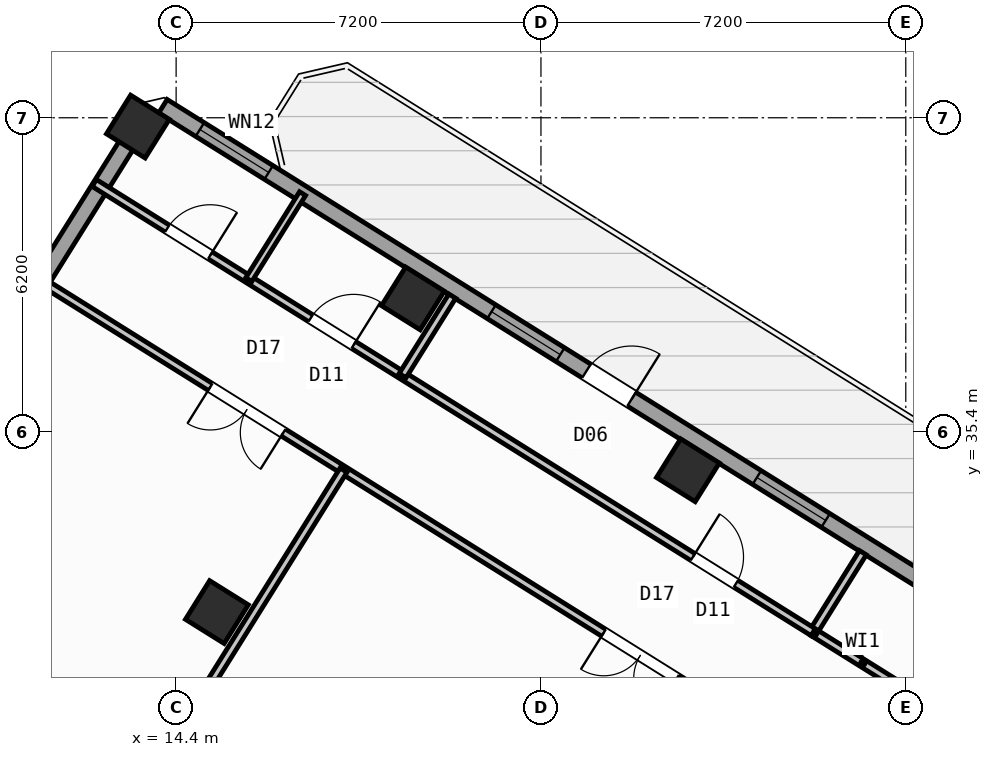
"""IFC4 building model, lengths in metres.
Left out: names, types, materials, properties, quantities, classifications, styles, units other than length and angle.
Written with IfcOpenShell. Run it as: python <this file> out.ifc"""

import sys

from ifc_helpers import new_model, si_unit, direction, frame, frame_2d, origin, origin_2d, place, context, subcontext, project, spatial, rectangle, hollow_rectangle, extrude, source, transform, mapped, element, fill, save


model = new_model("IFC4")
c1 = context("Model", 3, precision=1e-05, world=origin(), true_north=direction((0.0, 1.0)))
c2 = subcontext(c1, "Body", "Model", "MODEL_VIEW")
j1 = project(units=[si_unit("LENGTHUNIT", "METRE"), si_unit("PLANEANGLEUNIT", "RADIAN")], contexts=[c1])
p1 = place(None, origin())
s1 = spatial("IfcSite", under=j1, at=p1, CompositionType="ELEMENT")
p2 = place(p1, origin())
s2 = spatial("IfcBuilding", under=s1, at=p2, CompositionType="ELEMENT")
p3 = place(p2, frame((0.0, 0.0, 136.2)))
s3 = spatial("IfcBuildingStorey", under=s2, at=p3, CompositionType="ELEMENT", Elevation=136.2)
p4 = place(p3, frame((29.517, 30.594, 0.0), z_axis=(0.0, 0.0, 1.0), x_axis=(-0.529906864564, -0.848055844204, 0.0)))
e1 = element("IfcWall", 1, at=p4, inside=s3, PredefinedType="SHEAR", context=c2, shape_type="SweptSolid", body=[
    extrude(rectangle(XDim=3.575, YDim=0.55, at=frame_2d((1.788, 0.0))), origin(), (0.0, 0.0, 1.0), 4.25),
])
m1 = source(origin(), c2, "Body", "SweptSolid", [
    extrude(hollow_rectangle(XDim=0.9, YDim=0.9, WallThickness=0.036, at=origin_2d()), origin(), (0.0, 0.0, 1.0), 4.5),
])
for number, where, z_axis, x_axis in (
    (2, (24.5, 34.643, 0.0), (0.0, 0.0, 1.0), (-0.848, 0.53, 0.0)),
    (3, (19.073, 38.034, 0.0), (0.0, 0.0, 1.0), (-0.848, 0.53, 0.0)),
    (4, (15.205, 31.844, 0.0), (0.0, 0.0, 1.0), (-0.848, 0.53, 0.0)),
    (5, (13.646, 41.426, 0.0), (0.0, 0.0, 1.0), (-0.848, 0.53, 0.0)),
):
    element("IfcColumn", number, at=place(p3, frame(where, z_axis=z_axis, x_axis=x_axis)), inside=s3, PredefinedType="COLUMN", context=c2, shape_type="MappedRepresentation", body=[
        mapped(m1, transform((0.0, 0.0, 0.0), scale=1.0)),
    ])
p5 = place(p3, frame((2.415, 23.452, 0.0), z_axis=(0.0, 0.0, 1.0), x_axis=(0.52991049553, 0.848053575387, 0.0)))
e6 = element("IfcWall", 6, at=p5, inside=s3, PredefinedType="STANDARD", context=c2, shape_type="SweptSolid", body=[
    extrude(rectangle(XDim=21.587, YDim=0.32, at=frame_2d((10.794, 0.0))), origin(), (0.0, 0.0, 1.0), 3.675),
])
p6 = place(p5, frame((2.106, 0.0, 0.7)))
e7 = element("IfcOpeningElement", 7, at=p6, cuts=e6, PredefinedType="OPENING", context=c2, shape_type="SweptSolid", body=[
    extrude(rectangle(XDim=2.6, YDim=2.0, at=frame_2d((1.3, 1.0))), frame((0.0, 0.17, 0.0), z_axis=(0.0, -1.0, 0.0), x_axis=(1.0, 0.0, 0.0)), (0.0, 0.0, 1.0), 0.34),
])
p7 = place(p5, frame((9.244, 0.0, 0.75)))
e8 = element("IfcOpeningElement", 8, at=p7, cuts=e6, PredefinedType="OPENING", context=c2, shape_type="SweptSolid", body=[
    extrude(rectangle(XDim=2.0, YDim=1.95, at=frame_2d((1.0, 0.975))), frame((0.0, 0.17, 0.0), z_axis=(0.0, -1.0, 0.0), x_axis=(1.0, 0.0, 0.0)), (0.0, 0.0, 1.0), 0.34),
])
p8 = place(p5, frame((15.079, 0.0, 0.85)))
e9 = element("IfcOpeningElement", 9, at=p8, cuts=e6, PredefinedType="OPENING", context=c2, shape_type="SweptSolid", body=[
    extrude(rectangle(XDim=1.6, YDim=1.8, at=frame_2d((0.8, 0.9))), frame((0.0, 0.17, 0.0), z_axis=(0.0, -1.0, 0.0), x_axis=(1.0, 0.0, 0.0)), (0.0, 0.0, 1.0), 0.34),
])
p9 = place(p3, frame((14.138, 41.825, 0.0), z_axis=(0.0, 0.0, 1.0), x_axis=(0.848046498049, -0.529921821731, 0.0)))
e10 = element("IfcWall", 10, at=p9, inside=s3, PredefinedType="STANDARD", context=c2, shape_type="SweptSolid", body=[
    extrude(rectangle(XDim=31.588, YDim=0.32, at=frame_2d((15.794, 0.0))), origin(), (0.0, 0.0, 1.0), 4.25),
])
p10 = place(p9, frame((9.857, 0.0, 0.0)))
e11 = element("IfcOpeningElement", 11, at=p10, cuts=e10, PredefinedType="OPENING", context=c2, shape_type="SweptSolid", body=[
    extrude(rectangle(XDim=1.05, YDim=2.15, at=frame_2d((0.525, 1.075))), frame((0.0, 0.17, 0.0), z_axis=(0.0, -1.0, 0.0), x_axis=(1.0, 0.0, 0.0)), (0.0, 0.0, 1.0), 0.34),
])
p11 = place(p9, frame((0.862, 0.0, 0.85)))
e12 = element("IfcOpeningElement", 12, at=p11, cuts=e10, PredefinedType="OPENING", context=c2, shape_type="SweptSolid", body=[
    extrude(rectangle(XDim=1.6, YDim=1.8, at=frame_2d((0.8, 0.9))), frame((0.0, 0.17, 0.0), z_axis=(0.0, -1.0, 0.0), x_axis=(1.0, 0.0, 0.0)), (0.0, 0.0, 1.0), 0.34),
])
p12 = place(p9, frame((7.648, 0.0, 0.85)))
e13 = element("IfcOpeningElement", 13, at=p12, cuts=e10, PredefinedType="OPENING", context=c2, shape_type="SweptSolid", body=[
    extrude(rectangle(XDim=1.6, YDim=1.8, at=frame_2d((0.8, 0.9))), frame((0.0, 0.17, 0.0), z_axis=(0.0, -1.0, 0.0), x_axis=(1.0, 0.0, 0.0)), (0.0, 0.0, 1.0), 0.34),
])
p13 = place(p9, frame((13.824, 0.0, 0.85)))
e14 = element("IfcOpeningElement", 14, at=p13, cuts=e10, PredefinedType="OPENING", context=c2, shape_type="SweptSolid", body=[
    extrude(rectangle(XDim=1.6, YDim=1.8, at=frame_2d((0.8, 0.9))), frame((0.0, 0.17, 0.0), z_axis=(0.0, -1.0, 0.0), x_axis=(1.0, 0.0, 0.0)), (0.0, 0.0, 1.0), 0.34),
])
p14 = place(p9, frame((21.294, 0.0, 0.7)))
e15 = element("IfcOpeningElement", 15, at=p14, cuts=e10, PredefinedType="OPENING", context=c2, shape_type="SweptSolid", body=[
    extrude(rectangle(XDim=2.6, YDim=2.0, at=frame_2d((1.3, 1.0))), frame((0.0, 0.17, 0.0), z_axis=(0.0, -1.0, 0.0), x_axis=(1.0, 0.0, 0.0)), (0.0, 0.0, 1.0), 0.34),
])
p15 = place(p9, frame((26.894, 0.0, 0.7)))
e16 = element("IfcOpeningElement", 16, at=p15, cuts=e10, PredefinedType="OPENING", context=c2, shape_type="SweptSolid", body=[
    extrude(rectangle(XDim=2.6, YDim=2.0, at=frame_2d((1.3, 1.0))), frame((0.0, 0.17, 0.0), z_axis=(0.0, -1.0, 0.0), x_axis=(1.0, 0.0, 0.0)), (0.0, 0.0, 1.0), 0.34),
])
p16 = place(p3, frame((28.93, 30.224, 0.0), z_axis=(0.0, 0.0, 1.0), x_axis=(-0.848028015797, 0.529951398172, 0.0)))
e17 = element("IfcWall", 17, at=p16, inside=s3, PredefinedType="PARTITIONING", context=c2, shape_type="SweptSolid", body=[
    extrude(rectangle(XDim=2.308, YDim=0.16, at=frame_2d((1.154, 0.0))), origin(), (0.0, 0.0, 1.0), 4.24),
])
p17 = place(p3, frame((27.953, 33.016, 0.0), z_axis=(0.0, 0.0, 1.0), x_axis=(-0.529880305451, -0.848072439061, 0.0)))
e18 = element("IfcWall", 18, at=p17, inside=s3, PredefinedType="PARTITIONING", context=c2, shape_type="SweptSolid", body=[
    extrude(rectangle(XDim=1.85, YDim=0.16, at=frame_2d((0.925, 0.0))), origin(), (0.0, 0.0, 1.0), 4.24),
])
p18 = place(p3, frame((26.973, 31.447, 0.0), z_axis=(0.0, 0.0, 1.0), x_axis=(-0.848048310262, 0.529918921593, 0.0)))
e19 = element("IfcWall", 19, at=p18, inside=s3, PredefinedType="PARTITIONING", context=c2, shape_type="SweptSolid", body=[
    extrude(rectangle(XDim=16.73, YDim=0.16, at=frame_2d((8.365, 0.0))), origin(), (0.0, 0.0, 1.0), 4.24),
])
p19 = place(p18, frame((1.8, 0.0, 0.0)))
e20 = element("IfcOpeningElement", 20, at=p19, cuts=e19, PredefinedType="OPENING", context=c2, shape_type="SweptSolid", body=[
    extrude(rectangle(XDim=1.0, YDim=2.1, at=frame_2d((0.5, 1.05))), frame((0.0, 0.09, 0.0), z_axis=(0.0, -1.0, 0.0), x_axis=(1.0, 0.0, 0.0)), (0.0, 0.0, 1.0), 0.18),
])
p20 = place(p18, frame((10.695, 0.0, 0.0)))
e21 = element("IfcOpeningElement", 21, at=p20, cuts=e19, PredefinedType="OPENING", context=c2, shape_type="SweptSolid", body=[
    extrude(rectangle(XDim=1.0, YDim=2.1, at=frame_2d((0.5, 1.05))), frame((0.0, 0.09, 0.0), z_axis=(0.0, -1.0, 0.0), x_axis=(1.0, 0.0, 0.0)), (0.0, 0.0, 1.0), 0.18),
])
p21 = place(p18, frame((14.033, 0.0, 0.0)))
e22 = element("IfcOpeningElement", 22, at=p21, cuts=e19, PredefinedType="OPENING", context=c2, shape_type="SweptSolid", body=[
    extrude(rectangle(XDim=1.0, YDim=2.1, at=frame_2d((0.5, 1.05))), frame((0.0, 0.09, 0.0), z_axis=(0.0, -1.0, 0.0), x_axis=(1.0, 0.0, 0.0)), (0.0, 0.0, 1.0), 0.18),
])
p22 = place(p3, frame((25.807, 29.582, 0.0), z_axis=(0.0, 0.0, 1.0), x_axis=(-0.848052408131, 0.529912363569, 0.0)))
e23 = element("IfcWall", 23, at=p22, inside=s3, PredefinedType="PARTITIONING", context=c2, shape_type="SweptSolid", body=[
    extrude(rectangle(XDim=16.73, YDim=0.16, at=frame_2d((8.365, 0.0))), origin(), (0.0, 0.0, 1.0), 4.24),
])
p23 = place(p22, frame((1.8, 0.0, 0.0)))
e24 = element("IfcOpeningElement", 24, at=p23, cuts=e23, PredefinedType="OPENING", context=c2, shape_type="SweptSolid", body=[
    extrude(rectangle(XDim=1.7, YDim=2.2, at=frame_2d((0.85, 1.1))), frame((0.0, 0.09, 0.0), z_axis=(0.0, -1.0, 0.0), x_axis=(1.0, 0.0, 0.0)), (0.0, 0.0, 1.0), 0.18),
])
p24 = place(p22, frame((10.955, 0.0, 0.0)))
e25 = element("IfcOpeningElement", 25, at=p24, cuts=e23, PredefinedType="OPENING", context=c2, shape_type="SweptSolid", body=[
    extrude(rectangle(XDim=1.7, YDim=2.2, at=frame_2d((0.85, 1.1))), frame((0.0, 0.09, 0.0), z_axis=(0.0, -1.0, 0.0), x_axis=(1.0, 0.0, 0.0)), (0.0, 0.0, 1.0), 0.18),
])
p25 = place(p3, frame((17.704, 34.645, 0.0), z_axis=(0.0, 0.0, 1.0), x_axis=(-0.529918119251, -0.84804881162, 0.0)))
e26 = element("IfcWall", 26, at=p25, inside=s3, PredefinedType="PARTITIONING", context=c2, shape_type="SweptSolid", body=[
    extrude(rectangle(XDim=17.65, YDim=0.16, at=frame_2d((8.825, 0.0))), origin(), (0.0, 0.0, 1.0), 4.24),
])
p26 = place(p3, frame((19.85, 38.079, 0.0), z_axis=(0.0, 0.0, 1.0), x_axis=(-0.529880305451, -0.848072439061, 0.0)))
e27 = element("IfcWall", 27, at=p26, inside=s3, PredefinedType="PARTITIONING", context=c2, shape_type="SweptSolid", body=[
    extrude(rectangle(XDim=1.85, YDim=0.16, at=frame_2d((0.925, 0.0))), origin(), (0.0, 0.0, 1.0), 4.24),
])
p27 = place(p3, frame((16.895, 40.103, 0.0), z_axis=(0.0, 0.0, 1.0), x_axis=(-0.529867272195, -0.848080582172, 0.0)))
e28 = element("IfcWall", 28, at=p27, inside=s3, PredefinedType="PLUMBINGWALL", context=c2, shape_type="SweptSolid", body=[
    extrude(rectangle(XDim=2.0, YDim=0.14, at=frame_2d((1.0, 0.0))), origin(), (0.0, 0.0, 1.0), 4.24),
])
m2 = source(origin(), c2, "Body", "SweptSolid", [
    extrude(rectangle(XDim=1.05, YDim=2.15, at=frame_2d((0.525, 1.075))), frame((0.0, 0.025, 0.0), z_axis=(0.0, -1.0, 0.0), x_axis=(1.0, 0.0, 0.0)), (0.0, 0.0, 1.0), 0.05),
])
p28 = place(p10, origin())
e29 = element("IfcDoor", 29, at=p28, inside=s3, OperationType="SINGLE_SWING_RIGHT", PredefinedType="DOOR", context=c2, shape_type="MappedRepresentation", body=[
    mapped(m2, transform((0.0, 0.0, 0.0), scale=1.0)),
])
fill(e11, e29)
m3 = source(origin(), c2, "Body", "SweptSolid", [
    extrude(rectangle(XDim=1.6, YDim=1.8, at=frame_2d((0.8, 0.9))), frame((0.0, 0.03, 0.0), z_axis=(0.0, -1.0, 0.0), x_axis=(1.0, 0.0, 0.0)), (0.0, 0.0, 1.0), 0.06),
])
p29 = place(p11, origin())
e30 = element("IfcWindow", 30, at=p29, inside=s3, PartitioningType="SINGLE_PANEL", PredefinedType="WINDOW", context=c2, shape_type="MappedRepresentation", body=[
    mapped(m3, transform((0.0, 0.0, 0.0), scale=1.0)),
])
fill(e12, e30)
p30 = place(p12, origin())
e31 = element("IfcWindow", 31, at=p30, inside=s3, PartitioningType="SINGLE_PANEL", PredefinedType="WINDOW", context=c2, shape_type="MappedRepresentation", body=[
    mapped(m3, transform((0.0, 0.0, 0.0), scale=1.0)),
])
fill(e13, e31)
p31 = place(p13, origin())
e32 = element("IfcWindow", 32, at=p31, inside=s3, PartitioningType="SINGLE_PANEL", PredefinedType="WINDOW", context=c2, shape_type="MappedRepresentation", body=[
    mapped(m3, transform((0.0, 0.0, 0.0), scale=1.0)),
])
fill(e14, e32)
m4 = source(origin(), c2, "Body", "SweptSolid", [
    extrude(rectangle(XDim=1.7, YDim=2.2, at=frame_2d((0.85, 1.1))), frame((0.0, 0.025, 0.0), z_axis=(0.0, -1.0, 0.0), x_axis=(1.0, 0.0, 0.0)), (0.0, 0.0, 1.0), 0.05),
])
p32 = place(p23, origin())
e33 = element("IfcDoor", 33, at=p32, inside=s3, OperationType="DOUBLE_DOOR_SINGLE_SWING", PredefinedType="DOOR", context=c2, shape_type="MappedRepresentation", body=[
    mapped(m4, transform((0.0, 0.0, 0.0), scale=1.0)),
])
fill(e24, e33)
p33 = place(p24, origin())
e34 = element("IfcDoor", 34, at=p33, inside=s3, OperationType="DOUBLE_DOOR_SINGLE_SWING", PredefinedType="DOOR", context=c2, shape_type="MappedRepresentation", body=[
    mapped(m4, transform((0.0, 0.0, 0.0), scale=1.0)),
])
fill(e25, e34)
m5 = source(origin(), c2, "Body", "SweptSolid", [
    extrude(rectangle(XDim=1.0, YDim=2.1, at=frame_2d((0.5, 1.05))), frame((0.0, 0.025, 0.0), z_axis=(0.0, -1.0, 0.0), x_axis=(1.0, 0.0, 0.0)), (0.0, 0.0, 1.0), 0.05),
])
p34 = place(p19, frame((1.0, 0.0, 0.0), z_axis=(0.0, 0.0, 1.0), x_axis=(-1.0, 0.0, 0.0)))
e35 = element("IfcDoor", 35, at=p34, inside=s3, OperationType="SINGLE_SWING_LEFT", PredefinedType="DOOR", context=c2, shape_type="MappedRepresentation", body=[
    mapped(m5, transform((0.0, 0.0, 0.0), scale=1.0)),
])
fill(e20, e35)
p35 = place(p20, frame((1.0, 0.0, 0.0), z_axis=(0.0, 0.0, 1.0), x_axis=(-1.0, 0.0, 0.0)))
e36 = element("IfcDoor", 36, at=p35, inside=s3, OperationType="SINGLE_SWING_RIGHT", PredefinedType="DOOR", context=c2, shape_type="MappedRepresentation", body=[
    mapped(m5, transform((0.0, 0.0, 0.0), scale=1.0)),
])
fill(e21, e36)
p36 = place(p21, frame((1.0, 0.0, 0.0), z_axis=(0.0, 0.0, 1.0), x_axis=(-1.0, 0.0, 0.0)))
e37 = element("IfcDoor", 37, at=p36, inside=s3, OperationType="SINGLE_SWING_RIGHT", PredefinedType="DOOR", context=c2, shape_type="MappedRepresentation", body=[
    mapped(m5, transform((0.0, 0.0, 0.0), scale=1.0)),
])
fill(e22, e37)
save(model, sys.argv[1])
